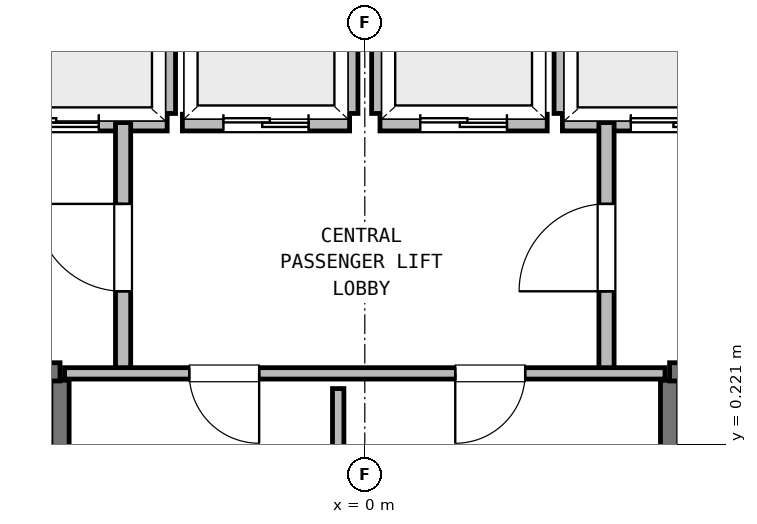
"""IFC4 building model, lengths in metres.
Left out: names, types, materials, properties, quantities, classifications, styles, units other than length and angle.
Written with IfcOpenShell. Run it as: python <this file> out.ifc"""

import sys

from ifc_helpers import new_model, si_unit, direction, frame, frame_2d, origin, place, context, subcontext, project, spatial, rectangle, extrude, element, fill, save


model = new_model("IFC4")
c1 = context("Model", 3, precision=1e-05, world=origin(), true_north=direction((0.0, 1.0)))
c2 = subcontext(c1, "Body", "Model", "MODEL_VIEW")
j1 = project(units=[si_unit("LENGTHUNIT", "METRE"), si_unit("PLANEANGLEUNIT", "RADIAN")], contexts=[c1])
p1 = place(None, origin())
s1 = spatial("IfcSite", under=j1, at=p1, CompositionType="ELEMENT")
p2 = place(p1, origin())
s2 = spatial("IfcBuilding", under=s1, at=p2, CompositionType="ELEMENT")
p3 = place(p2, frame((0.0, 0.0, 286.0)))
s3 = spatial("IfcBuildingStorey", under=s2, at=p3, CompositionType="ELEMENT", Elevation=286.0)
p4 = place(p3, frame((-4.01, -6.16, 0.0), z_axis=(0.0, 0.0, 1.0), x_axis=(0.0, 1.0, 0.0)))
e1 = element("IfcWall", 1, at=p4, inside=s3, PredefinedType="SHEAR", context=c2, shape_type="SweptSolid", body=[
    extrude(rectangle(XDim=7.22, YDim=0.24, at=frame_2d((3.61, 0.0))), origin(), (0.0, 0.0, 1.0), 4.13),
])
p5 = place(p3, frame((-6.97, 1.17, 0.0), z_axis=(0.0, 0.0, 1.0), x_axis=(1.0, 0.0, 0.0)))
e2 = element("IfcWall", 2, at=p5, inside=s3, PredefinedType="SHEAR", context=c2, shape_type="SweptSolid", body=[
    extrude(rectangle(XDim=2.96, YDim=0.24, at=frame_2d((1.48, 0.0))), origin(), (0.0, 0.0, 1.0), 4.13),
])
p6 = place(p5, frame((0.9, 0.0, 0.0)))
e3 = element("IfcOpeningElement", 3, at=p6, cuts=e2, PredefinedType="OPENING", context=c2, shape_type="SweptSolid", body=[
    extrude(rectangle(XDim=1.15, YDim=2.15, at=frame_2d((0.575, 1.075))), frame((0.0, 0.13, 0.0), z_axis=(0.0, -1.0, 0.0), x_axis=(1.0, 0.0, 0.0)), (0.0, 0.0, 1.0), 0.26),
])
p7 = place(p3, frame((4.01, -6.16, 0.0), z_axis=(0.0, 0.0, 1.0), x_axis=(0.0, 1.0, 0.0)))
e4 = element("IfcWall", 4, at=p7, inside=s3, PredefinedType="SHEAR", context=c2, shape_type="SweptSolid", body=[
    extrude(rectangle(XDim=7.22, YDim=0.24, at=frame_2d((3.61, 0.0))), origin(), (0.0, 0.0, 1.0), 4.13),
])
p8 = place(p3, frame((4.01, 1.17, 0.0), z_axis=(0.0, 0.0, 1.0), x_axis=(1.0, 0.0, 0.0)))
e5 = element("IfcWall", 5, at=p8, inside=s3, PredefinedType="SHEAR", context=c2, shape_type="SweptSolid", body=[
    extrude(rectangle(XDim=2.96, YDim=0.24, at=frame_2d((1.48, 0.0))), origin(), (0.0, 0.0, 1.0), 4.13),
])
p9 = place(p8, frame((0.9, 0.0, 0.0)))
e6 = element("IfcOpeningElement", 6, at=p9, cuts=e5, PredefinedType="OPENING", context=c2, shape_type="SweptSolid", body=[
    extrude(rectangle(XDim=1.15, YDim=2.15, at=frame_2d((0.575, 1.075))), frame((0.0, 0.13, 0.0), z_axis=(0.0, -1.0, 0.0), x_axis=(1.0, 0.0, 0.0)), (0.0, 0.0, 1.0), 0.26),
])
p10 = place(p3, frame((-5.0, 4.45, 0.0), z_axis=(0.0, 0.0, 1.0), x_axis=(1.0, 0.0, 0.0)))
e7 = element("IfcWall", 7, at=p10, inside=s3, PredefinedType="PARTITIONING", context=c2, shape_type="SweptSolid", body=[
    extrude(rectangle(XDim=2.4, YDim=0.22, at=frame_2d((1.2, 0.0))), origin(), (0.0, 0.0, 1.0), 4.13),
])
p11 = place(p10, frame((0.28, 0.0, 0.0)))
e8 = element("IfcOpeningElement", 8, at=p11, cuts=e7, PredefinedType="OPENING", context=c2, shape_type="SweptSolid", body=[
    extrude(rectangle(XDim=1.22, YDim=2.15, at=frame_2d((0.61, 1.075))), frame((0.0, 0.12, 0.0), z_axis=(0.0, -1.0, 0.0), x_axis=(1.0, 0.0, 0.0)), (0.0, 0.0, 1.0), 0.24),
])
p12 = place(p3, frame((-2.6, 4.57, 0.0), z_axis=(0.0, 0.0, 1.0), x_axis=(0.0, 1.0, 0.0)))
e9 = element("IfcWall", 9, at=p12, inside=s3, PredefinedType="PARTITIONING", context=c2, shape_type="SweptSolid", body=[
    extrude(rectangle(XDim=2.155, YDim=0.22, at=frame_2d((1.078, 0.0))), origin(), (0.0, 0.0, 1.0), 4.13),
])
p13 = place(p3, frame((2.6, 4.45, 0.0), z_axis=(0.0, 0.0, 1.0), x_axis=(1.0, 0.0, 0.0)))
e10 = element("IfcWall", 10, at=p13, inside=s3, PredefinedType="PARTITIONING", context=c2, shape_type="SweptSolid", body=[
    extrude(rectangle(XDim=2.4, YDim=0.22, at=frame_2d((1.2, 0.0))), origin(), (0.0, 0.0, 1.0), 4.13),
])
p14 = place(p13, frame((0.9, 0.0, 0.0)))
e11 = element("IfcOpeningElement", 11, at=p14, cuts=e10, PredefinedType="OPENING", context=c2, shape_type="SweptSolid", body=[
    extrude(rectangle(XDim=1.22, YDim=2.15, at=frame_2d((0.61, 1.075))), frame((0.0, 0.12, 0.0), z_axis=(0.0, -1.0, 0.0), x_axis=(1.0, 0.0, 0.0)), (0.0, 0.0, 1.0), 0.24),
])
p15 = place(p3, frame((2.6, 4.57, 0.0), z_axis=(0.0, 0.0, 1.0), x_axis=(0.0, 1.0, 0.0)))
e12 = element("IfcWall", 12, at=p15, inside=s3, PredefinedType="PARTITIONING", context=c2, shape_type="SweptSolid", body=[
    extrude(rectangle(XDim=2.155, YDim=0.22, at=frame_2d((1.078, 0.0))), origin(), (0.0, 0.0, 1.0), 4.13),
])
p16 = place(p3, frame((-2.4, 4.45, 0.0), z_axis=(0.0, 0.0, 1.0), x_axis=(1.0, 0.0, 0.0)))
e13 = element("IfcWall", 13, at=p16, inside=s3, PredefinedType="PARTITIONING", context=c2, shape_type="SweptSolid", body=[
    extrude(rectangle(XDim=2.2, YDim=0.22, at=frame_2d((1.1, 0.0))), origin(), (0.0, 0.0, 1.0), 4.13),
])
p17 = place(p16, frame((0.54, 0.0, 0.0)))
e14 = element("IfcOpeningElement", 14, at=p17, cuts=e13, PredefinedType="OPENING", context=c2, shape_type="SweptSolid", body=[
    extrude(rectangle(XDim=1.12, YDim=2.15, at=frame_2d((0.56, 1.075))), frame((0.0, 0.12, 0.0), z_axis=(0.0, -1.0, 0.0), x_axis=(1.0, 0.0, 0.0)), (0.0, 0.0, 1.0), 0.24),
])
p18 = place(p3, frame((-0.2, 4.57, 0.0), z_axis=(0.0, 0.0, 1.0), x_axis=(0.0, 1.0, 0.0)))
e15 = element("IfcWall", 15, at=p18, inside=s3, PredefinedType="PARTITIONING", context=c2, shape_type="SweptSolid", body=[
    extrude(rectangle(XDim=2.155, YDim=0.22, at=frame_2d((1.078, 0.0))), origin(), (0.0, 0.0, 1.0), 4.13),
])
p19 = place(p3, frame((0.2, 4.45, 0.0), z_axis=(0.0, 0.0, 1.0), x_axis=(1.0, 0.0, 0.0)))
e16 = element("IfcWall", 16, at=p19, inside=s3, PredefinedType="PARTITIONING", context=c2, shape_type="SweptSolid", body=[
    extrude(rectangle(XDim=2.2, YDim=0.22, at=frame_2d((1.1, 0.0))), origin(), (0.0, 0.0, 1.0), 4.13),
])
p20 = place(p19, frame((0.53, 0.0, 0.0)))
e17 = element("IfcOpeningElement", 17, at=p20, cuts=e16, PredefinedType="OPENING", context=c2, shape_type="SweptSolid", body=[
    extrude(rectangle(XDim=1.14, YDim=2.15, at=frame_2d((0.57, 1.075))), frame((0.0, 0.12, 0.0), z_axis=(0.0, -1.0, 0.0), x_axis=(1.0, 0.0, 0.0)), (0.0, 0.0, 1.0), 0.24),
])
p21 = place(p3, frame((0.2, 4.57, 0.0), z_axis=(0.0, 0.0, 1.0), x_axis=(0.0, 1.0, 0.0)))
e18 = element("IfcWall", 18, at=p21, inside=s3, PredefinedType="PARTITIONING", context=c2, shape_type="SweptSolid", body=[
    extrude(rectangle(XDim=2.155, YDim=0.22, at=frame_2d((1.078, 0.0))), origin(), (0.0, 0.0, 1.0), 4.13),
])
p22 = place(p3, frame((-3.18, 1.15, 0.0), z_axis=(0.0, 0.0, 1.0), x_axis=(0.0, 1.0, 0.0)))
e19 = element("IfcWall", 19, at=p22, inside=s3, PredefinedType="PARTITIONING", context=c2, shape_type="SweptSolid", body=[
    extrude(rectangle(XDim=3.3, YDim=0.2, at=frame_2d((1.65, 0.0))), origin(), (0.0, 0.0, 1.0), 4.13),
])
p23 = place(p22, frame((1.08, 0.0, 0.0)))
e20 = element("IfcOpeningElement", 20, at=p23, cuts=e19, PredefinedType="OPENING", context=c2, shape_type="SweptSolid", body=[
    extrude(rectangle(XDim=1.15, YDim=2.15, at=frame_2d((0.575, 1.075))), frame((0.0, 0.11, 0.0), z_axis=(0.0, -1.0, 0.0), x_axis=(1.0, 0.0, 0.0)), (0.0, 0.0, 1.0), 0.22),
])
p24 = place(p3, frame((3.18, 1.15, 0.0), z_axis=(0.0, 0.0, 1.0), x_axis=(0.0, 1.0, 0.0)))
e21 = element("IfcWall", 21, at=p24, inside=s3, PredefinedType="PARTITIONING", context=c2, shape_type="SweptSolid", body=[
    extrude(rectangle(XDim=3.3, YDim=0.2, at=frame_2d((1.65, 0.0))), origin(), (0.0, 0.0, 1.0), 4.13),
])
p25 = place(p24, frame((1.08, 0.0, 0.0)))
e22 = element("IfcOpeningElement", 22, at=p25, cuts=e21, PredefinedType="OPENING", context=c2, shape_type="SweptSolid", body=[
    extrude(rectangle(XDim=1.15, YDim=2.15, at=frame_2d((0.575, 1.075))), frame((0.0, 0.11, 0.0), z_axis=(0.0, -1.0, 0.0), x_axis=(1.0, 0.0, 0.0)), (0.0, 0.0, 1.0), 0.22),
])
p26 = place(p3, frame((3.95, 1.15, 0.0), z_axis=(0.0, 0.0, 1.0), x_axis=(-1.0, 0.0, 0.0)))
e23 = element("IfcWall", 23, at=p26, inside=s3, PredefinedType="PARTITIONING", context=c2, shape_type="SweptSolid", body=[
    extrude(rectangle(XDim=7.9, YDim=0.15, at=frame_2d((3.95, 0.0))), origin(), (0.0, 0.0, 1.0), 4.13),
])
p27 = place(p26, frame((5.34, 0.0, 0.0)))
e24 = element("IfcOpeningElement", 24, at=p27, cuts=e23, PredefinedType="OPENING", context=c2, shape_type="SweptSolid", body=[
    extrude(rectangle(XDim=0.92, YDim=2.05, at=frame_2d((0.46, 1.025))), frame((0.0, 0.085, 0.0), z_axis=(0.0, -1.0, 0.0), x_axis=(1.0, 0.0, 0.0)), (0.0, 0.0, 1.0), 0.17),
])
p28 = place(p26, frame((1.84, 0.0, 0.0)))
e25 = element("IfcOpeningElement", 25, at=p28, cuts=e23, PredefinedType="OPENING", context=c2, shape_type="SweptSolid", body=[
    extrude(rectangle(XDim=0.92, YDim=2.05, at=frame_2d((0.46, 1.025))), frame((0.0, 0.085, 0.0), z_axis=(0.0, -1.0, 0.0), x_axis=(1.0, 0.0, 0.0)), (0.0, 0.0, 1.0), 0.17),
])
p29 = place(p3, frame((-0.35, -1.73, 0.0), z_axis=(0.0, 0.0, 1.0), x_axis=(0.0, 1.0, 0.0)))
e26 = element("IfcWall", 26, at=p29, inside=s3, PredefinedType="PARTITIONING", context=c2, shape_type="SweptSolid", body=[
    extrude(rectangle(XDim=2.68, YDim=0.15, at=frame_2d((1.34, 0.0))), origin(), (0.0, 0.0, 1.0), 4.13),
])
p30 = place(p11, origin())
e27 = element("IfcDoor", 27, at=p30, inside=s3, OperationType="DOUBLE_DOOR_SLIDING", PredefinedType="DOOR", context=c2, shape_type="SweptSolid", body=[
    extrude(rectangle(XDim=1.22, YDim=2.15, at=frame_2d((0.61, 1.075))), frame((0.0, 0.025, 0.0), z_axis=(0.0, -1.0, 0.0), x_axis=(1.0, 0.0, 0.0)), (0.0, 0.0, 1.0), 0.05),
])
fill(e8, e27)
p31 = place(p14, origin())
e28 = element("IfcDoor", 28, at=p31, inside=s3, OperationType="DOUBLE_DOOR_SLIDING", PredefinedType="DOOR", context=c2, shape_type="SweptSolid", body=[
    extrude(rectangle(XDim=1.22, YDim=2.15, at=frame_2d((0.61, 1.075))), frame((0.0, 0.025, 0.0), z_axis=(0.0, -1.0, 0.0), x_axis=(1.0, 0.0, 0.0)), (0.0, 0.0, 1.0), 0.05),
])
fill(e11, e28)
p32 = place(p17, origin())
e29 = element("IfcDoor", 29, at=p32, inside=s3, OperationType="DOUBLE_DOOR_SLIDING", PredefinedType="DOOR", context=c2, shape_type="SweptSolid", body=[
    extrude(rectangle(XDim=1.12, YDim=2.15, at=frame_2d((0.56, 1.075))), frame((0.0, 0.025, 0.0), z_axis=(0.0, -1.0, 0.0), x_axis=(1.0, 0.0, 0.0)), (0.0, 0.0, 1.0), 0.05),
])
fill(e14, e29)
p33 = place(p20, origin())
e30 = element("IfcDoor", 30, at=p33, inside=s3, OperationType="DOUBLE_DOOR_SLIDING", PredefinedType="DOOR", context=c2, shape_type="SweptSolid", body=[
    extrude(rectangle(XDim=1.14, YDim=2.15, at=frame_2d((0.57, 1.075))), frame((0.0, 0.025, 0.0), z_axis=(0.0, -1.0, 0.0), x_axis=(1.0, 0.0, 0.0)), (0.0, 0.0, 1.0), 0.05),
])
fill(e17, e30)
p34 = place(p23, origin())
e31 = element("IfcDoor", 31, at=p34, inside=s3, OperationType="SINGLE_SWING_RIGHT", PredefinedType="DOOR", context=c2, shape_type="SweptSolid", body=[
    extrude(rectangle(XDim=1.15, YDim=2.15, at=frame_2d((0.575, 1.075))), frame((0.0, 0.025, 0.0), z_axis=(0.0, -1.0, 0.0), x_axis=(1.0, 0.0, 0.0)), (0.0, 0.0, 1.0), 0.05),
])
fill(e20, e31)
p35 = place(p25, origin())
e32 = element("IfcDoor", 32, at=p35, inside=s3, OperationType="SINGLE_SWING_LEFT", PredefinedType="DOOR", context=c2, shape_type="SweptSolid", body=[
    extrude(rectangle(XDim=1.15, YDim=2.15, at=frame_2d((0.575, 1.075))), frame((0.0, 0.025, 0.0), z_axis=(0.0, -1.0, 0.0), x_axis=(1.0, 0.0, 0.0)), (0.0, 0.0, 1.0), 0.05),
])
fill(e22, e32)
p36 = place(p27, origin())
e33 = element("IfcDoor", 33, at=p36, inside=s3, OperationType="SINGLE_SWING_LEFT", PredefinedType="DOOR", context=c2, shape_type="SweptSolid", body=[
    extrude(rectangle(XDim=0.92, YDim=2.05, at=frame_2d((0.46, 1.025))), frame((0.0, 0.025, 0.0), z_axis=(0.0, -1.0, 0.0), x_axis=(1.0, 0.0, 0.0)), (0.0, 0.0, 1.0), 0.05),
])
fill(e24, e33)
p37 = place(p28, origin())
e34 = element("IfcDoor", 34, at=p37, inside=s3, OperationType="SINGLE_SWING_RIGHT", PredefinedType="DOOR", context=c2, shape_type="SweptSolid", body=[
    extrude(rectangle(XDim=0.92, YDim=2.05, at=frame_2d((0.46, 1.025))), frame((0.0, 0.025, 0.0), z_axis=(0.0, -1.0, 0.0), x_axis=(1.0, 0.0, 0.0)), (0.0, 0.0, 1.0), 0.05),
])
fill(e25, e34)
save(model, sys.argv[1])
